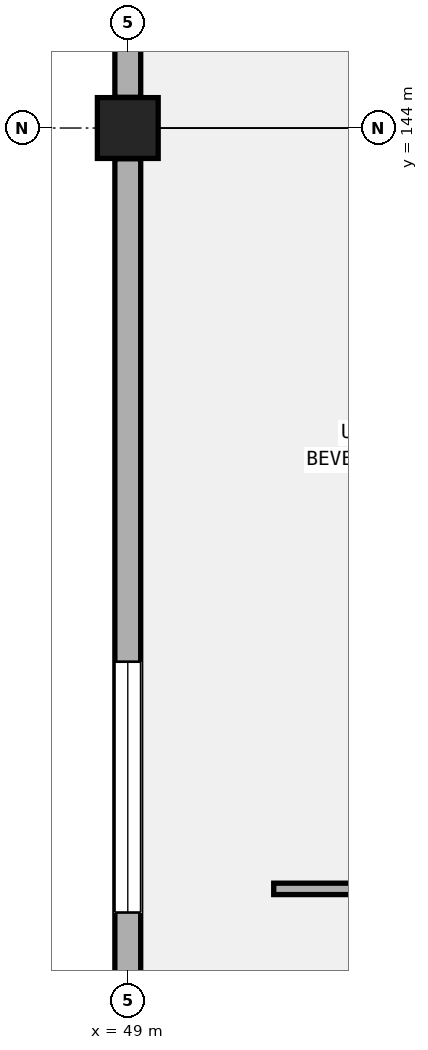
"""IFC4 building model, lengths in metres.
Left out: names, types, materials, properties, quantities, classifications, styles, units other than length and angle.
Written with IfcOpenShell. Run it as: python <this file> out.ifc"""

import sys

from ifc_helpers import new_model, si_unit, direction, frame, frame_2d, origin, origin_2d, place, context, subcontext, project, spatial, rectangle, extrude, element, fill, save


model = new_model("IFC4")
c1 = context("Model", 3, precision=1e-05, world=origin(), true_north=direction((0.0, 1.0)))
c2 = subcontext(c1, "Body", "Model", "MODEL_VIEW")
j1 = project(units=[si_unit("LENGTHUNIT", "METRE"), si_unit("PLANEANGLEUNIT", "RADIAN")], contexts=[c1])
p1 = place(None, origin())
s1 = spatial("IfcSite", under=j1, at=p1, CompositionType="ELEMENT")
p2 = place(p1, origin())
s2 = spatial("IfcBuilding", under=s1, at=p2, CompositionType="ELEMENT")
p3 = place(p2, frame((0.0, 0.0, 15.3)))
s3 = spatial("IfcBuildingStorey", under=s2, at=p3, CompositionType="ELEMENT", Elevation=15.3)
p4 = place(p3, frame((49.0, 144.0, 0.0), z_axis=(0.0, 0.0, 1.0), x_axis=(1.0, 0.0, 0.0)))
e1 = element("IfcColumn", 1, at=p4, inside=s3, PredefinedType="COLUMN", context=c2, shape_type="SweptSolid", body=[
    extrude(rectangle(XDim=0.8, YDim=0.8, at=origin_2d()), origin(), (0.0, 0.0, 1.0), 5.1),
])
p5 = place(p3, frame((49.0, 132.179, 0.0), z_axis=(0.0, 0.0, 1.0), x_axis=(0.0, 1.0, 0.0)))
e2 = element("IfcWall", 2, at=p5, inside=s3, PredefinedType="SOLIDWALL", context=c2, shape_type="SweptSolid", body=[
    extrude(rectangle(XDim=11.417, YDim=0.34, at=frame_2d((5.708, 0.0))), origin(), (0.0, 0.0, 1.0), 4.06),
])
p6 = place(p5, frame((1.5, 0.0, 0.95)))
e3 = element("IfcOpeningElement", 3, at=p6, cuts=e2, PredefinedType="OPENING", context=c2, shape_type="SweptSolid", body=[
    extrude(rectangle(XDim=3.3, YDim=1.8, at=frame_2d((1.65, 0.9))), frame((0.0, 0.18, 0.0), z_axis=(0.0, -1.0, 0.0), x_axis=(1.0, 0.0, 0.0)), (0.0, 0.0, 1.0), 0.36),
])
p7 = place(p3, frame((49.0, 144.404, 0.0), z_axis=(0.0, 0.0, 1.0), x_axis=(0.0, 1.0, 0.0)))
e4 = element("IfcWall", 4, at=p7, inside=s3, PredefinedType="SOLIDWALL", context=c2, shape_type="SweptSolid", body=[
    extrude(rectangle(XDim=0.65, YDim=0.34, at=frame_2d((0.325, 0.0))), origin(), (0.0, 0.0, 1.0), 4.16),
])
p8 = place(p3, frame((50.92, 133.99, 0.0), z_axis=(0.0, 0.0, 1.0), x_axis=(1.0, 0.0, 0.0)))
e5 = element("IfcWall", 5, at=p8, inside=s3, PredefinedType="PARTITIONING", context=c2, shape_type="SweptSolid", body=[
    extrude(rectangle(XDim=10.42, YDim=0.15, at=frame_2d((5.21, 0.0))), origin(), (0.0, 0.0, 1.0), 2.77),
])
p9 = place(p8, frame((4.56, 0.0, 0.0)))
e6 = element("IfcOpeningElement", 6, at=p9, cuts=e5, PredefinedType="OPENING", context=c2, shape_type="SweptSolid", body=[
    extrude(rectangle(XDim=1.3, YDim=2.24, at=frame_2d((0.65, 1.12))), frame((0.0, 0.085, 0.0), z_axis=(0.0, -1.0, 0.0), x_axis=(1.0, 0.0, 0.0)), (0.0, 0.0, 1.0), 0.17),
])
p10 = place(p6, origin())
e7 = element("IfcWindow", 7, at=p10, inside=s3, PartitioningType="SINGLE_PANEL", PredefinedType="WINDOW", context=c2, shape_type="SweptSolid", body=[
    extrude(rectangle(XDim=3.3, YDim=1.8, at=frame_2d((1.65, 0.9))), frame((0.0, 0.03, 0.0), z_axis=(0.0, -1.0, 0.0), x_axis=(1.0, 0.0, 0.0)), (0.0, 0.0, 1.0), 0.06),
])
fill(e3, e7)
save(model, sys.argv[1])
